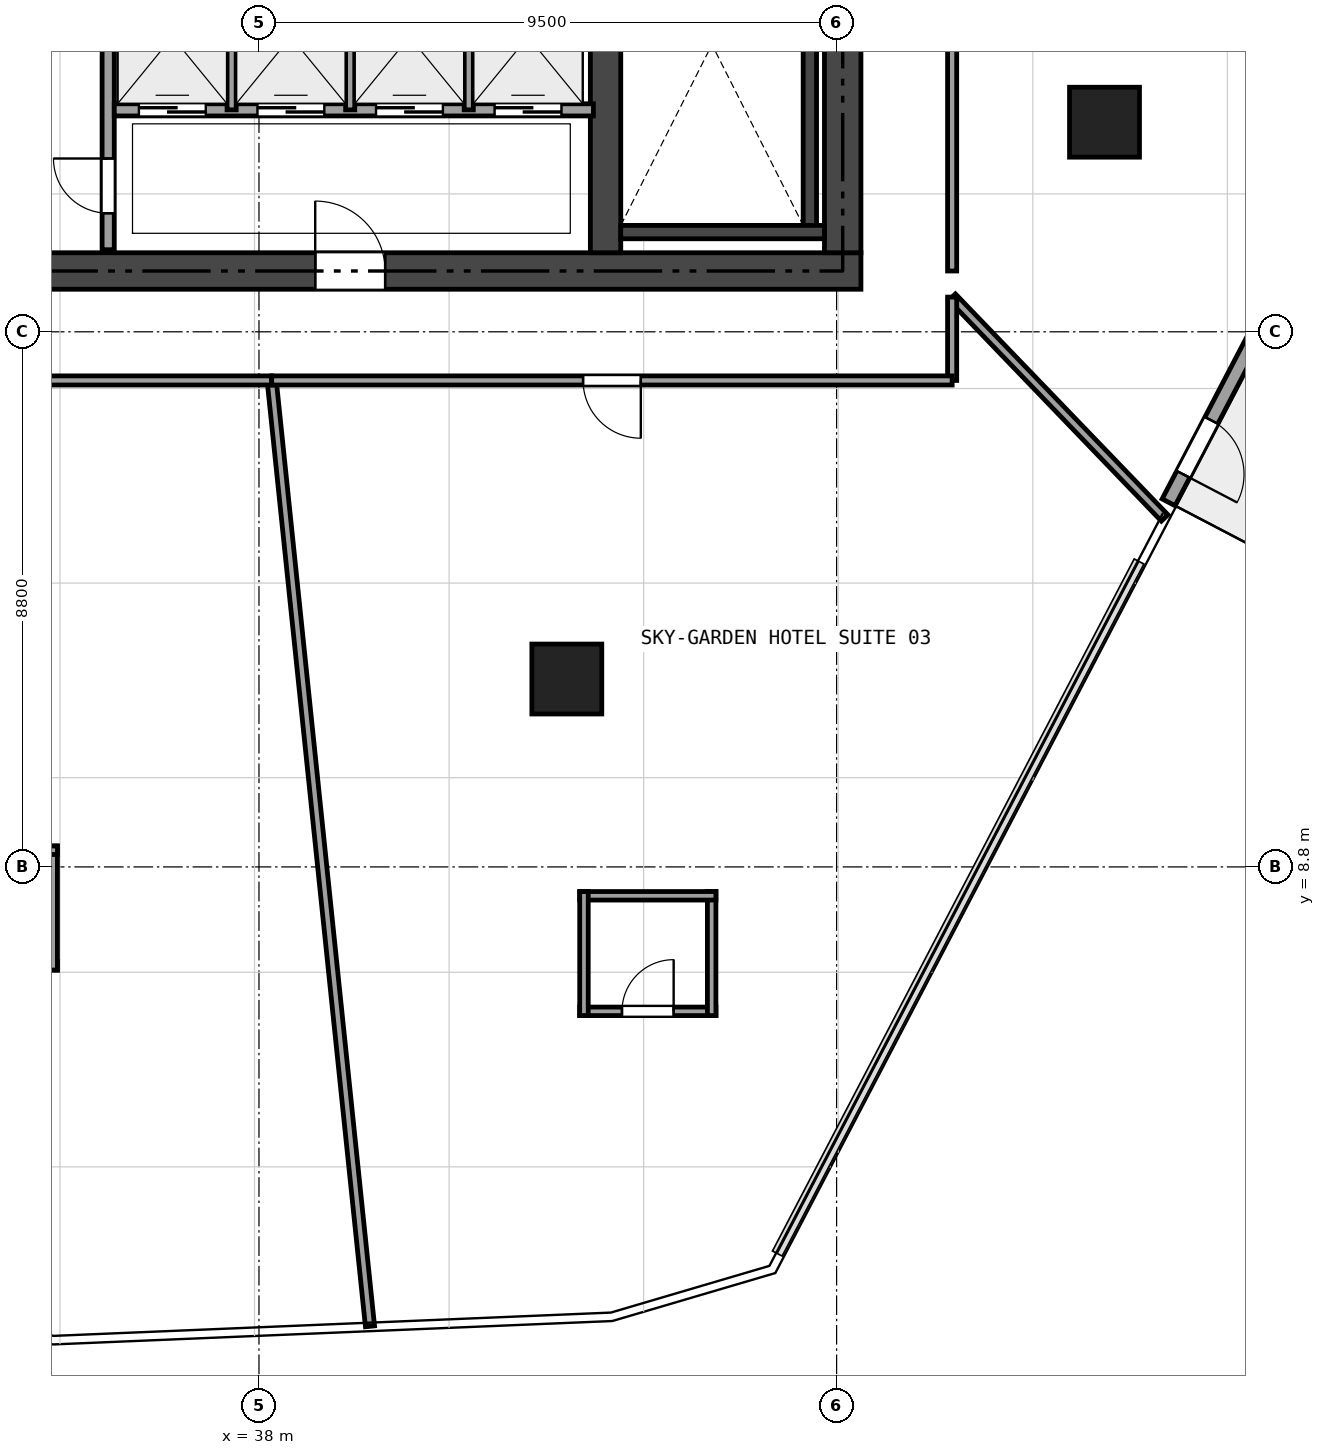
"""IFC4 building model, lengths in metres.
Left out: names, types, materials, properties, quantities, classifications, styles, units other than length and angle.
Written with IfcOpenShell. Run it as: python <this file> out.ifc"""

import sys

from ifc_helpers import new_model, si_unit, direction, frame, frame_2d, origin, origin_2d, place, context, subcontext, project, spatial, rectangle, extrude, element, fill, save


model = new_model("IFC4")
c1 = context("Model", 3, precision=1e-05, world=origin(), true_north=direction((0.0, 1.0)))
c2 = subcontext(c1, "Body", "Model", "MODEL_VIEW")
j1 = project(units=[si_unit("LENGTHUNIT", "METRE"), si_unit("PLANEANGLEUNIT", "RADIAN")], contexts=[c1])
p1 = place(None, origin())
s1 = spatial("IfcSite", under=j1, at=p1, CompositionType="ELEMENT")
p2 = place(p1, origin())
s2 = spatial("IfcBuilding", under=s1, at=p2, CompositionType="ELEMENT")
p3 = place(p2, frame((0.0, 0.0, 76.35)))
s3 = spatial("IfcBuildingStorey", under=s2, at=p3, CompositionType="ELEMENT", Elevation=76.35)
p4 = place(p3, frame((26.5, 18.6, 0.0), z_axis=(0.0, 0.0, 1.0), x_axis=(1.0, 0.0, 0.0)))
e1 = element("IfcWall", 1, at=p4, inside=s3, PredefinedType="SHEAR", context=c2, shape_type="SweptSolid", body=[
    extrude(rectangle(XDim=21.4, YDim=0.6, at=frame_2d((10.7, 0.0))), origin(), (0.0, 0.0, 1.0), 3.17),
])
p5 = place(p4, frame((12.425, 0.0, 0.0)))
e2 = element("IfcOpeningElement", 2, at=p5, cuts=e1, PredefinedType="OPENING", context=c2, shape_type="SweptSolid", body=[
    extrude(rectangle(XDim=1.15, YDim=2.15, at=frame_2d((0.575, 1.075))), frame((0.0, 0.31, 0.0), z_axis=(0.0, -1.0, 0.0), x_axis=(1.0, 0.0, 0.0)), (0.0, 0.0, 1.0), 0.62),
])
p6 = place(p4, frame((5.25, 0.0, 0.0)))
e3 = element("IfcOpeningElement", 3, at=p6, cuts=e1, PredefinedType="OPENING", context=c2, shape_type="SweptSolid", body=[
    extrude(rectangle(XDim=0.9, YDim=2.1, at=frame_2d((0.45, 1.05))), frame((0.0, 0.31, 0.0), z_axis=(0.0, -1.0, 0.0), x_axis=(1.0, 0.0, 0.0)), (0.0, 0.0, 1.0), 0.62),
])
p7 = place(p3, frame((47.6, 18.9, 0.0), z_axis=(0.0, 0.0, 1.0), x_axis=(0.0, 1.0, 0.0)))
e4 = element("IfcWall", 4, at=p7, inside=s3, PredefinedType="SHEAR", context=c2, shape_type="SweptSolid", body=[
    extrude(rectangle(XDim=15.0, YDim=0.6, at=frame_2d((7.5, 0.0))), origin(), (0.0, 0.0, 1.0), 3.17),
])
p8 = place(p7, frame((6.6, 0.0, 0.0)))
e5 = element("IfcOpeningElement", 5, at=p8, cuts=e4, PredefinedType="OPENING", context=c2, shape_type="SweptSolid", body=[
    extrude(rectangle(XDim=1.1, YDim=2.15, at=frame_2d((0.55, 1.075))), frame((0.0, 0.31, 0.0), z_axis=(0.0, -1.0, 0.0), x_axis=(1.0, 0.0, 0.0)), (0.0, 0.0, 1.0), 0.62),
])
p9 = place(p7, frame((8.5, 0.0, 0.0)))
e6 = element("IfcOpeningElement", 6, at=p9, cuts=e4, PredefinedType="OPENING", context=c2, shape_type="SweptSolid", body=[
    extrude(rectangle(XDim=0.9, YDim=2.1, at=frame_2d((0.45, 1.05))), frame((0.0, 0.31, 0.0), z_axis=(0.0, -1.0, 0.0), x_axis=(1.0, 0.0, 0.0)), (0.0, 0.0, 1.0), 0.62),
])
p10 = place(p7, frame((13.15, 0.0, 0.0)))
e7 = element("IfcOpeningElement", 7, at=p10, cuts=e4, PredefinedType="OPENING", context=c2, shape_type="SweptSolid", body=[
    extrude(rectangle(XDim=0.9, YDim=2.1, at=frame_2d((0.45, 1.05))), frame((0.0, 0.31, 0.0), z_axis=(0.0, -1.0, 0.0), x_axis=(1.0, 0.0, 0.0)), (0.0, 0.0, 1.0), 0.62),
])
p11 = place(p3, frame((43.7, 18.9, 0.0), z_axis=(0.0, 0.0, 1.0), x_axis=(0.0, 1.0, 0.0)))
e8 = element("IfcWall", 8, at=p11, inside=s3, PredefinedType="SHEAR", context=c2, shape_type="SweptSolid", body=[
    extrude(rectangle(XDim=15.0, YDim=0.5, at=frame_2d((7.5, 0.0))), origin(), (0.0, 0.0, 1.0), 3.17),
])
p12 = place(p11, frame((8.1, 0.0, 0.0)))
e9 = element("IfcOpeningElement", 9, at=p12, cuts=e8, PredefinedType="OPENING", context=c2, shape_type="SweptSolid", body=[
    extrude(rectangle(XDim=0.9, YDim=2.1, at=frame_2d((0.45, 1.05))), frame((0.0, 0.26, 0.0), z_axis=(0.0, -1.0, 0.0), x_axis=(1.0, 0.0, 0.0)), (0.0, 0.0, 1.0), 0.52),
])
p13 = place(p3, frame((47.06, 19.35, 0.0), z_axis=(0.0, 0.0, 1.0), x_axis=(0.0, 1.0, 0.0)))
e10 = element("IfcWall", 10, at=p13, inside=s3, PredefinedType="SHEAR", context=c2, shape_type="SweptSolid", body=[
    extrude(rectangle(XDim=5.9, YDim=0.22, at=frame_2d((2.95, 0.0))), origin(), (0.0, 0.0, 1.0), 3.17),
])
p14 = place(p3, frame((43.95, 19.24, 0.0), z_axis=(0.0, 0.0, 1.0), x_axis=(1.0, 0.0, 0.0)))
e11 = element("IfcWall", 11, at=p14, inside=s3, PredefinedType="SHEAR", context=c2, shape_type="SweptSolid", body=[
    extrude(rectangle(XDim=3.35, YDim=0.22, at=frame_2d((1.675, 0.0))), origin(), (0.0, 0.0, 1.0), 3.17),
])
for number, where, z_axis, x_axis in (
    (12, (43.063, 11.89, -0.405), (0.0, 0.0, 1.0), (1.0, 0.0, 0.0)),
    (13, (51.906, 21.047, -0.405), (0.0, 0.0, 1.0), (1.0, 0.0, 0.0)),
):
    element("IfcColumn", number, at=place(p3, frame(where, z_axis=z_axis, x_axis=x_axis)), inside=s3, PredefinedType="COLUMN", context=c2, shape_type="SweptSolid", body=[
        extrude(rectangle(XDim=1.15, YDim=1.15, at=origin_2d()), origin(), (0.0, 0.0, 1.0), 3.575),
    ])
p15 = place(p3, frame((55.833, 20.291, 0.0), z_axis=(0.0, 0.0, 1.0), x_axis=(-0.463330108623, -0.8861857652, 0.0)))
e14 = element("IfcWall", 14, at=p15, inside=s3, PredefinedType="SOLIDWALL", context=c2, shape_type="SweptSolid", body=[
    extrude(rectangle(XDim=6.201, YDim=0.24, at=frame_2d((3.101, 0.0))), origin(), (0.0, 0.0, 1.0), 3.17),
])
p16 = place(p15, frame((4.681, 0.0, 0.0)))
e15 = element("IfcOpeningElement", 15, at=p16, cuts=e14, PredefinedType="OPENING", context=c2, shape_type="SweptSolid", body=[
    extrude(rectangle(XDim=1.0, YDim=2.15, at=frame_2d((0.5, 1.075))), frame((0.0, 0.13, 0.0), z_axis=(0.0, -1.0, 0.0), x_axis=(1.0, 0.0, 0.0)), (0.0, 0.0, 1.0), 0.26),
])
p17 = place(p15, frame((0.52, 0.0, 0.2)))
e16 = element("IfcOpeningElement", 16, at=p17, cuts=e14, PredefinedType="OPENING", context=c2, shape_type="SweptSolid", body=[
    extrude(rectangle(XDim=1.2, YDim=1.8, at=frame_2d((0.6, 0.9))), frame((0.0, 0.13, 0.0), z_axis=(0.0, -1.0, 0.0), x_axis=(1.0, 0.0, 0.0)), (0.0, 0.0, 1.0), 0.26),
])
p18 = place(p3, frame((35.52, 18.95, 0.0), z_axis=(0.0, 0.0, 1.0), x_axis=(0.0, 1.0, 0.0)))
e17 = element("IfcWall", 17, at=p18, inside=s3, PredefinedType="SOLIDWALL", context=c2, shape_type="SweptSolid", body=[
    extrude(rectangle(XDim=14.9, YDim=0.2, at=frame_2d((7.45, 0.0))), origin(), (0.0, 0.0, 1.0), 2.691),
])
p19 = place(p18, frame((7.755, 0.0, 0.0)))
e18 = element("IfcOpeningElement", 18, at=p19, cuts=e17, PredefinedType="OPENING", context=c2, shape_type="SweptSolid", body=[
    extrude(rectangle(XDim=0.95, YDim=2.15, at=frame_2d((0.475, 1.075))), frame((0.0, 0.11, 0.0), z_axis=(0.0, -1.0, 0.0), x_axis=(1.0, 0.0, 0.0)), (0.0, 0.0, 1.0), 0.22),
])
p20 = place(p18, frame((0.6, 0.0, 0.0)))
e19 = element("IfcOpeningElement", 19, at=p20, cuts=e17, PredefinedType="OPENING", context=c2, shape_type="SweptSolid", body=[
    extrude(rectangle(XDim=0.9, YDim=2.1, at=frame_2d((0.45, 1.05))), frame((0.0, 0.11, 0.0), z_axis=(0.0, -1.0, 0.0), x_axis=(1.0, 0.0, 0.0)), (0.0, 0.0, 1.0), 0.22),
])
p21 = place(p3, frame((35.62, 21.25, 0.0), z_axis=(0.0, 0.0, 1.0), x_axis=(1.0, 0.0, 0.0)))
e20 = element("IfcWall", 20, at=p21, inside=s3, PredefinedType="SOLIDWALL", context=c2, shape_type="SweptSolid", body=[
    extrude(rectangle(XDim=7.88, YDim=0.2, at=frame_2d((3.94, 0.0))), origin(), (0.0, 0.0, 1.0), 3.17),
])
p22 = place(p21, frame((0.405, 0.0, 0.0)))
e21 = element("IfcOpeningElement", 21, at=p22, cuts=e20, PredefinedType="OPENING", context=c2, shape_type="SweptSolid", body=[
    extrude(rectangle(XDim=1.1, YDim=2.15, at=frame_2d((0.55, 1.075))), frame((0.0, 0.11, 0.0), z_axis=(0.0, -1.0, 0.0), x_axis=(1.0, 0.0, 0.0)), (0.0, 0.0, 1.0), 0.22),
])
p23 = place(p21, frame((2.355, 0.0, 0.0)))
e22 = element("IfcOpeningElement", 22, at=p23, cuts=e20, PredefinedType="OPENING", context=c2, shape_type="SweptSolid", body=[
    extrude(rectangle(XDim=1.1, YDim=2.15, at=frame_2d((0.55, 1.075))), frame((0.0, 0.11, 0.0), z_axis=(0.0, -1.0, 0.0), x_axis=(1.0, 0.0, 0.0)), (0.0, 0.0, 1.0), 0.22),
])
p24 = place(p21, frame((4.305, 0.0, 0.0)))
e23 = element("IfcOpeningElement", 23, at=p24, cuts=e20, PredefinedType="OPENING", context=c2, shape_type="SweptSolid", body=[
    extrude(rectangle(XDim=1.1, YDim=2.15, at=frame_2d((0.55, 1.075))), frame((0.0, 0.11, 0.0), z_axis=(0.0, -1.0, 0.0), x_axis=(1.0, 0.0, 0.0)), (0.0, 0.0, 1.0), 0.22),
])
p25 = place(p21, frame((6.255, 0.0, 0.0)))
e24 = element("IfcOpeningElement", 24, at=p25, cuts=e20, PredefinedType="OPENING", context=c2, shape_type="SweptSolid", body=[
    extrude(rectangle(XDim=1.1, YDim=2.15, at=frame_2d((0.55, 1.075))), frame((0.0, 0.11, 0.0), z_axis=(0.0, -1.0, 0.0), x_axis=(1.0, 0.0, 0.0)), (0.0, 0.0, 1.0), 0.22),
])
for number, where, z_axis, x_axis in (
    (25, (37.55, 21.25, 0.0), (0.0, 0.0, 1.0), (0.0, 1.0, 0.0)),
    (26, (39.5, 21.25, 0.0), (0.0, 0.0, 1.0), (0.0, 1.0, 0.0)),
    (27, (41.45, 21.25, 0.0), (0.0, 0.0, 1.0), (0.0, 1.0, 0.0)),
):
    element("IfcWall", number, at=place(p3, frame(where, z_axis=z_axis, x_axis=x_axis)), inside=s3, PredefinedType="PARTITIONING", context=c2, shape_type="SweptSolid", body=[
        extrude(rectangle(XDim=2.4, YDim=0.15, at=frame_2d((1.2, 0.0))), origin(), (0.0, 0.0, 1.0), 2.691),
    ])
p26 = place(p3, frame((32.445, 7.174, 0.0), z_axis=(0.0, 0.0, 1.0), x_axis=(1.0, 0.0, 0.0)))
e28 = element("IfcWall", 28, at=p26, inside=s3, PredefinedType="PARTITIONING", context=c2, shape_type="SweptSolid", body=[
    extrude(rectangle(XDim=2.24, YDim=0.14, at=frame_2d((1.12, 0.0))), origin(), (0.0, 0.0, 1.0), 3.17),
])
p27 = place(p26, frame((0.695, 0.0, 0.0)))
e29 = element("IfcOpeningElement", 29, at=p27, cuts=e28, PredefinedType="OPENING", context=c2, shape_type="SweptSolid", body=[
    extrude(rectangle(XDim=0.85, YDim=2.1, at=frame_2d((0.425, 1.05))), frame((0.0, 0.08, 0.0), z_axis=(0.0, -1.0, 0.0), x_axis=(1.0, 0.0, 0.0)), (0.0, 0.0, 1.0), 0.16),
])
p28 = place(p3, frame((34.615, 7.104, 0.0), z_axis=(0.0, 0.0, 1.0), x_axis=(0.0, 1.0, 0.0)))
e30 = element("IfcWall", 30, at=p28, inside=s3, PredefinedType="PARTITIONING", context=c2, shape_type="SweptSolid", body=[
    extrude(rectangle(XDim=2.04, YDim=0.14, at=frame_2d((1.02, 0.0))), origin(), (0.0, 0.0, 1.0), 3.17),
])
p29 = place(p3, frame((34.685, 9.074, 0.0), z_axis=(0.0, 0.0, 1.0), x_axis=(-1.0, 0.0, 0.0)))
e31 = element("IfcWall", 31, at=p29, inside=s3, PredefinedType="PARTITIONING", context=c2, shape_type="SweptSolid", body=[
    extrude(rectangle(XDim=2.24, YDim=0.14, at=frame_2d((1.12, 0.0))), origin(), (0.0, 0.0, 1.0), 3.17),
])
p30 = place(p3, frame((43.275, 6.425, 0.0), z_axis=(0.0, 0.0, 1.0), x_axis=(1.0, 0.0, 0.0)))
e32 = element("IfcWall", 32, at=p30, inside=s3, PredefinedType="PARTITIONING", context=c2, shape_type="SweptSolid", body=[
    extrude(rectangle(XDim=2.24, YDim=0.14, at=frame_2d((1.12, 0.0))), origin(), (0.0, 0.0, 1.0), 3.17),
])
p31 = place(p30, frame((0.695, 0.0, 0.0)))
e33 = element("IfcOpeningElement", 33, at=p31, cuts=e32, PredefinedType="OPENING", context=c2, shape_type="SweptSolid", body=[
    extrude(rectangle(XDim=0.85, YDim=2.1, at=frame_2d((0.425, 1.05))), frame((0.0, 0.08, 0.0), z_axis=(0.0, -1.0, 0.0), x_axis=(1.0, 0.0, 0.0)), (0.0, 0.0, 1.0), 0.16),
])
p32 = place(p3, frame((45.445, 6.355, 0.0), z_axis=(0.0, 0.0, 1.0), x_axis=(0.0, 1.0, 0.0)))
e34 = element("IfcWall", 34, at=p32, inside=s3, PredefinedType="PARTITIONING", context=c2, shape_type="SweptSolid", body=[
    extrude(rectangle(XDim=2.04, YDim=0.14, at=frame_2d((1.02, 0.0))), origin(), (0.0, 0.0, 1.0), 3.17),
])
p33 = place(p3, frame((45.515, 8.325, 0.0), z_axis=(0.0, 0.0, 1.0), x_axis=(-1.0, 0.0, 0.0)))
e35 = element("IfcWall", 35, at=p33, inside=s3, PredefinedType="PARTITIONING", context=c2, shape_type="SweptSolid", body=[
    extrude(rectangle(XDim=2.24, YDim=0.14, at=frame_2d((1.12, 0.0))), origin(), (0.0, 0.0, 1.0), 3.17),
])
p34 = place(p3, frame((43.345, 8.395, 0.0), z_axis=(0.0, 0.0, 1.0), x_axis=(0.0, -1.0, 0.0)))
e36 = element("IfcWall", 36, at=p34, inside=s3, PredefinedType="PARTITIONING", context=c2, shape_type="SweptSolid", body=[
    extrude(rectangle(XDim=2.04, YDim=0.14, at=frame_2d((1.02, 0.0))), origin(), (0.0, 0.0, 1.0), 3.17),
])
p35 = place(p3, frame((39.826, 1.245, 0.0), z_axis=(0.0, 0.0, 1.0), x_axis=(-0.103393409404, 0.994640539538, 0.0)))
e37 = element("IfcWall", 37, at=p35, inside=s3, PredefinedType="PARTITIONING", context=c2, shape_type="SweptSolid", body=[
    extrude(rectangle(XDim=15.639, YDim=0.15, at=frame_2d((7.819, 0.0))), origin(), (0.0, 0.0, 1.0), 2.455),
])
p36 = place(p3, frame((38.209, 16.8, 0.0), z_axis=(0.0, 0.0, 1.0), x_axis=(-1.0, 0.0, 0.0)))
e38 = element("IfcWall", 38, at=p36, inside=s3, PredefinedType="PARTITIONING", context=c2, shape_type="SweptSolid", body=[
    extrude(rectangle(XDim=11.671, YDim=0.15, at=frame_2d((5.835, 0.0))), origin(), (0.0, 0.0, 1.0), 2.455),
])
p37 = place(p36, frame((5.361, 0.0, 0.0)))
e39 = element("IfcOpeningElement", 39, at=p37, cuts=e38, PredefinedType="OPENING", context=c2, shape_type="SweptSolid", body=[
    extrude(rectangle(XDim=0.95, YDim=2.15, at=frame_2d((0.475, 1.075))), frame((0.0, 0.085, 0.0), z_axis=(0.0, -1.0, 0.0), x_axis=(1.0, 0.0, 0.0)), (0.0, 0.0, 1.0), 0.17),
])
p38 = place(p3, frame((52.895, 14.539, 0.0), z_axis=(0.0, 0.0, 1.0), x_axis=(-0.693414536175, 0.720538882379, 0.0)))
e40 = element("IfcWall", 40, at=p38, inside=s3, PredefinedType="PARTITIONING", context=c2, shape_type="SweptSolid", body=[
    extrude(rectangle(XDim=5.041, YDim=0.15, at=frame_2d((2.52, 0.0))), origin(), (0.0, 0.0, 1.0), 3.17),
])
p39 = place(p3, frame((49.4, 18.171, 0.0), z_axis=(0.0, 0.0, 1.0), x_axis=(0.0, -1.0, 0.0)))
e41 = element("IfcWall", 41, at=p39, inside=s3, PredefinedType="PARTITIONING", context=c2, shape_type="SweptSolid", body=[
    extrude(rectangle(XDim=1.371, YDim=0.15, at=frame_2d((0.686, 0.0))), origin(), (0.0, 0.0, 1.0), 3.17),
])
p40 = place(p3, frame((49.4, 16.8, 0.0), z_axis=(0.0, 0.0, 1.0), x_axis=(-1.0, 0.0, 0.0)))
e42 = element("IfcWall", 42, at=p40, inside=s3, PredefinedType="PARTITIONING", context=c2, shape_type="SweptSolid", body=[
    extrude(rectangle(XDim=11.191, YDim=0.15, at=frame_2d((5.595, 0.0))), origin(), (0.0, 0.0, 1.0), 2.455),
])
p41 = place(p40, frame((5.12, 0.0, 0.0)))
e43 = element("IfcOpeningElement", 43, at=p41, cuts=e42, PredefinedType="OPENING", context=c2, shape_type="SweptSolid", body=[
    extrude(rectangle(XDim=0.95, YDim=2.15, at=frame_2d((0.475, 1.075))), frame((0.0, 0.085, 0.0), z_axis=(0.0, -1.0, 0.0), x_axis=(1.0, 0.0, 0.0)), (0.0, 0.0, 1.0), 0.17),
])
p42 = place(p3, frame((49.4, 29.669, 0.0), z_axis=(0.0, 0.0, 1.0), x_axis=(0.0, -1.0, 0.0)))
e44 = element("IfcWall", 44, at=p42, inside=s3, PredefinedType="PARTITIONING", context=c2, shape_type="SweptSolid", body=[
    extrude(rectangle(XDim=11.069, YDim=0.15, at=frame_2d((5.534, 0.0))), origin(), (0.0, 0.0, 1.0), 2.455),
])
p43 = place(p42, frame((5.06, 0.0, 0.0)))
e45 = element("IfcOpeningElement", 45, at=p43, cuts=e44, PredefinedType="OPENING", context=c2, shape_type="SweptSolid", body=[
    extrude(rectangle(XDim=0.95, YDim=2.15, at=frame_2d((0.475, 1.075))), frame((0.0, 0.085, 0.0), z_axis=(0.0, -1.0, 0.0), x_axis=(1.0, 0.0, 0.0)), (0.0, 0.0, 1.0), 0.17),
])
p44 = place(p16, origin())
e46 = element("IfcDoor", 46, at=p44, inside=s3, OperationType="SINGLE_SWING_RIGHT", PredefinedType="DOOR", context=c2, shape_type="SweptSolid", body=[
    extrude(rectangle(XDim=1.0, YDim=2.15, at=frame_2d((0.5, 1.075))), frame((0.0, 0.025, 0.0), z_axis=(0.0, -1.0, 0.0), x_axis=(1.0, 0.0, 0.0)), (0.0, 0.0, 1.0), 0.05),
])
fill(e15, e46)
p45 = place(p5, origin())
e47 = element("IfcDoor", 47, at=p45, inside=s3, OperationType="SINGLE_SWING_LEFT", PredefinedType="DOOR", context=c2, shape_type="SweptSolid", body=[
    extrude(rectangle(XDim=1.15, YDim=2.15, at=frame_2d((0.575, 1.075))), frame((0.0, 0.025, 0.0), z_axis=(0.0, -1.0, 0.0), x_axis=(1.0, 0.0, 0.0)), (0.0, 0.0, 1.0), 0.05),
])
fill(e2, e47)
p46 = place(p20, origin())
e48 = element("IfcDoor", 48, at=p46, inside=s3, OperationType="SINGLE_SWING_RIGHT", PredefinedType="DOOR", context=c2, shape_type="SweptSolid", body=[
    extrude(rectangle(XDim=0.9, YDim=2.1, at=frame_2d((0.45, 1.05))), frame((0.0, 0.025, 0.0), z_axis=(0.0, -1.0, 0.0), x_axis=(1.0, 0.0, 0.0)), (0.0, 0.0, 1.0), 0.05),
])
fill(e19, e48)
p47 = place(p22, origin())
e49 = element("IfcDoor", 49, at=p47, inside=s3, OperationType="SLIDING_TO_LEFT", PredefinedType="DOOR", context=c2, shape_type="SweptSolid", body=[
    extrude(rectangle(XDim=1.1, YDim=2.15, at=frame_2d((0.55, 1.075))), frame((0.0, 0.025, 0.0), z_axis=(0.0, -1.0, 0.0), x_axis=(1.0, 0.0, 0.0)), (0.0, 0.0, 1.0), 0.05),
])
fill(e21, e49)
p48 = place(p23, origin())
e50 = element("IfcDoor", 50, at=p48, inside=s3, OperationType="SLIDING_TO_LEFT", PredefinedType="DOOR", context=c2, shape_type="SweptSolid", body=[
    extrude(rectangle(XDim=1.1, YDim=2.15, at=frame_2d((0.55, 1.075))), frame((0.0, 0.025, 0.0), z_axis=(0.0, -1.0, 0.0), x_axis=(1.0, 0.0, 0.0)), (0.0, 0.0, 1.0), 0.05),
])
fill(e22, e50)
p49 = place(p24, origin())
e51 = element("IfcDoor", 51, at=p49, inside=s3, OperationType="SLIDING_TO_LEFT", PredefinedType="DOOR", context=c2, shape_type="SweptSolid", body=[
    extrude(rectangle(XDim=1.1, YDim=2.15, at=frame_2d((0.55, 1.075))), frame((0.0, 0.025, 0.0), z_axis=(0.0, -1.0, 0.0), x_axis=(1.0, 0.0, 0.0)), (0.0, 0.0, 1.0), 0.05),
])
fill(e23, e51)
p50 = place(p25, origin())
e52 = element("IfcDoor", 52, at=p50, inside=s3, OperationType="SLIDING_TO_LEFT", PredefinedType="DOOR", context=c2, shape_type="SweptSolid", body=[
    extrude(rectangle(XDim=1.1, YDim=2.15, at=frame_2d((0.55, 1.075))), frame((0.0, 0.025, 0.0), z_axis=(0.0, -1.0, 0.0), x_axis=(1.0, 0.0, 0.0)), (0.0, 0.0, 1.0), 0.05),
])
fill(e24, e52)
p51 = place(p41, origin())
e53 = element("IfcDoor", 53, at=p51, inside=s3, OperationType="SINGLE_SWING_LEFT", PredefinedType="DOOR", context=c2, shape_type="SweptSolid", body=[
    extrude(rectangle(XDim=0.95, YDim=2.15, at=frame_2d((0.475, 1.075))), frame((0.0, 0.025, 0.0), z_axis=(0.0, -1.0, 0.0), x_axis=(1.0, 0.0, 0.0)), (0.0, 0.0, 1.0), 0.05),
])
fill(e43, e53)
p52 = place(p31, origin())
e54 = element("IfcDoor", 54, at=p52, inside=s3, OperationType="SINGLE_SWING_RIGHT", PredefinedType="DOOR", context=c2, shape_type="SweptSolid", body=[
    extrude(rectangle(XDim=0.85, YDim=2.1, at=frame_2d((0.425, 1.05))), frame((0.0, 0.025, 0.0), z_axis=(0.0, -1.0, 0.0), x_axis=(1.0, 0.0, 0.0)), (0.0, 0.0, 1.0), 0.05),
])
fill(e33, e54)
save(model, sys.argv[1])
